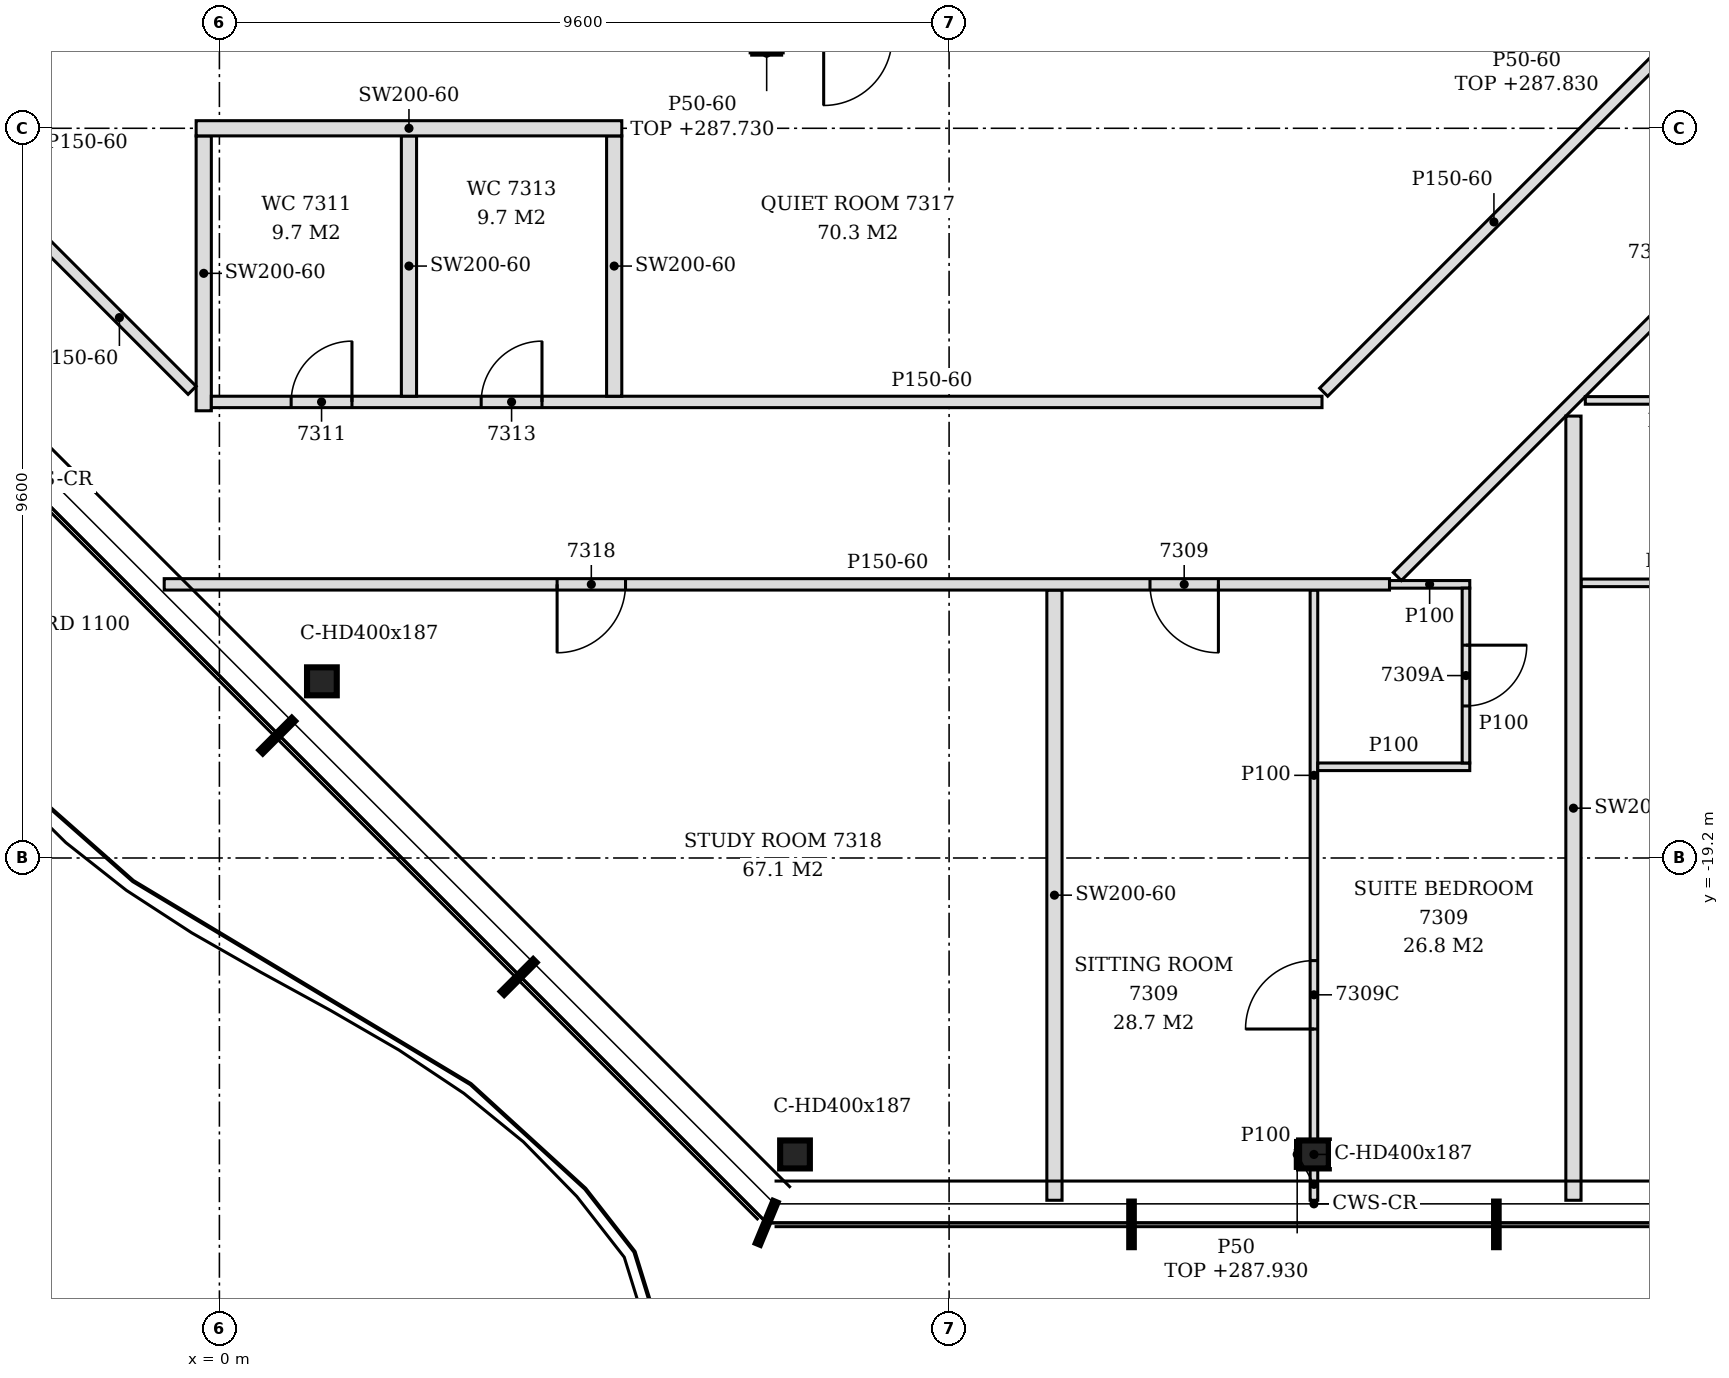
"""IFC4 building model, lengths in metres.
Left out: names, types, materials, properties, quantities, classifications, styles, units other than length and angle.
Written with IfcOpenShell. Run it as: python <this file> out.ifc"""

import sys

from ifc_helpers import new_model, si_unit, direction, frame, frame_2d, origin, origin_2d, place, context, subcontext, project, spatial, polyline, rectangle, i_section, outline, extrude, element, fill, save


model = new_model("IFC4")
c1 = context("Model", 3, precision=1e-05, world=origin(), true_north=direction((0.0, 1.0)))
c2 = subcontext(c1, "Body", "Model", "MODEL_VIEW")
j1 = project(units=[si_unit("LENGTHUNIT", "METRE"), si_unit("PLANEANGLEUNIT", "RADIAN")], contexts=[c1])
p1 = place(None, origin())
s1 = spatial("IfcSite", under=j1, at=p1, CompositionType="ELEMENT")
p2 = place(p1, origin())
s2 = spatial("IfcBuilding", under=s1, at=p2, CompositionType="ELEMENT")
p3 = place(p2, frame((0.0, 0.0, 285.0)))
s3 = spatial("IfcBuildingStorey", under=s2, at=p3, CompositionType="ELEMENT", Elevation=285.0)
for number, where, z_axis, x_axis in (
    (1, (7.573, -23.1, -0.15), (0.0, 0.0, 1.0), (1.0, 0.0, 0.0)),
    (2, (14.4, -23.1, -0.15), (0.0, 0.0, 1.0), (1.0, 0.0, 0.0)),
    (3, (1.348, -16.876, -0.15), (0.0, 0.0, 1.0), (1.0, 0.0, 0.0)),
):
    element("IfcColumn", number, at=place(p3, frame(where, z_axis=z_axis, x_axis=x_axis)), inside=s3, PredefinedType="COLUMN", context=c2, shape_type="SweptSolid", body=[
        extrude(i_section(OverallWidth=0.391, OverallDepth=0.368, WebThickness=0.015, FlangeThickness=0.024, FilletRadius=0.015, at=origin_2d()), origin(), (0.0, 0.0, 1.0), 3.6),
    ])
p4 = place(p3, frame((10.986, -23.703, 0.0), z_axis=(0.0, 0.0, 1.0), x_axis=(0.0, 1.0, 0.0)))
e4 = element("IfcWall", 4, at=p4, inside=s3, PredefinedType="PARTITIONING", context=c2, shape_type="SweptSolid", body=[
    extrude(outline(polyline([(0.0, 0.0), (8.028, 0.0), (8.028, 3.45), (4.608, 3.45), (4.606, 2.88), (4.398, 2.88), (4.396, 3.45), (0.753, 3.45), (0.751, 2.93), (0.453, 2.93), (0.451, 3.45), (0.0, 3.45), (0.0, 0.0)])), frame((0.0, 0.1, 0.0), z_axis=(0.0, -1.0, 0.0), x_axis=(1.0, 0.0, 0.0)), (0.0, 0.0, 1.0), 0.2),
])
p5 = place(p3, frame((14.4, -23.703, 0.0), z_axis=(0.0, 0.0, 1.0), x_axis=(0.0, 1.0, 0.0)))
e5 = element("IfcWall", 5, at=p5, inside=s3, PredefinedType="PARTITIONING", context=c2, shape_type="SweptSolid", body=[
    extrude(rectangle(XDim=0.419, YDim=0.1, at=frame_2d((0.209, 0.0))), origin(), (0.0, 0.0, 1.0), 3.45),
])
p6 = place(p3, frame((17.814, -23.703, 0.0), z_axis=(0.0, 0.0, 1.0), x_axis=(0.0, 1.0, 0.0)))
e6 = element("IfcWall", 6, at=p6, inside=s3, PredefinedType="PARTITIONING", context=c2, shape_type="SweptSolid", body=[
    extrude(outline(polyline([(0.0, 0.0), (10.317, 0.0), (10.317, 3.45), (9.408, 3.45), (9.406, 2.88), (9.198, 2.88), (9.196, 3.45), (4.608, 3.45), (4.606, 2.88), (4.398, 2.88), (4.396, 3.45), (0.753, 3.45), (0.751, 2.93), (0.453, 2.93), (0.451, 3.45), (0.0, 3.45), (0.0, 0.0)])), frame((0.0, 0.1, 0.0), z_axis=(0.0, -1.0, 0.0), x_axis=(1.0, 0.0, 0.0)), (0.0, 0.0, 1.0), 0.2),
])
p7 = place(p3, frame((14.4, -22.916, 0.0), z_axis=(0.0, 0.0, 1.0), x_axis=(0.0, 1.0, 0.0)))
e7 = element("IfcWall", 7, at=p7, inside=s3, PredefinedType="PARTITIONING", context=c2, shape_type="SweptSolid", body=[
    extrude(outline(polyline([(0.0, 0.0), (7.241, 0.0), (7.241, 3.45), (3.821, 3.45), (3.819, 2.88), (3.611, 2.88), (3.609, 3.45), (0.0, 3.45), (0.0, 0.0)])), frame((0.0, 0.05, 0.0), z_axis=(0.0, -1.0, 0.0), x_axis=(1.0, 0.0, 0.0)), (0.0, 0.0, 1.0), 0.1),
])
p8 = place(p7, frame((1.466, 0.0, 0.0)))
e8 = element("IfcOpeningElement", 8, at=p8, cuts=e7, PredefinedType="OPENING", context=c2, shape_type="SweptSolid", body=[
    extrude(rectangle(XDim=0.9, YDim=2.1, at=frame_2d((0.45, 1.05))), frame((0.0, 0.06, 0.0), z_axis=(0.0, -1.0, 0.0), x_axis=(1.0, 0.0, 0.0)), (0.0, 0.0, 1.0), 0.12),
])
p9 = place(p3, frame((14.45, -18.0, 0.0), z_axis=(0.0, 0.0, 1.0), x_axis=(1.0, 0.0, 0.0)))
e9 = element("IfcWall", 9, at=p9, inside=s3, PredefinedType="PARTITIONING", context=c2, shape_type="SweptSolid", body=[
    extrude(rectangle(XDim=2.0, YDim=0.1, at=frame_2d((1.0, 0.0))), origin(), (0.0, 0.0, 1.0), 3.45),
])
p10 = place(p3, frame((16.4, -17.95, 0.0), z_axis=(0.0, 0.0, 1.0), x_axis=(0.0, 1.0, 0.0)))
e10 = element("IfcWall", 10, at=p10, inside=s3, PredefinedType="PARTITIONING", context=c2, shape_type="SweptSolid", body=[
    extrude(rectangle(XDim=2.3, YDim=0.1, at=frame_2d((1.15, 0.0))), origin(), (0.0, 0.0, 1.0), 3.45),
])
p11 = place(p10, frame((0.75, 0.0, 0.0)))
e11 = element("IfcOpeningElement", 11, at=p11, cuts=e10, PredefinedType="OPENING", context=c2, shape_type="SweptSolid", body=[
    extrude(rectangle(XDim=0.8, YDim=2.1, at=frame_2d((0.4, 1.05))), frame((0.0, 0.06, 0.0), z_axis=(0.0, -1.0, 0.0), x_axis=(1.0, 0.0, 0.0)), (0.0, 0.0, 1.0), 0.12),
])
p12 = place(p3, frame((-0.726, -15.6, 0.0), z_axis=(0.0, 0.0, 1.0), x_axis=(1.0, 0.0, 0.0)))
e12 = element("IfcWall", 12, at=p12, inside=s3, PredefinedType="PARTITIONING", context=c2, shape_type="SweptSolid", body=[
    extrude(outline(polyline([(0.0, 0.0), (16.12, 0.0), (16.12, 3.45), (8.076, 3.45), (8.074, 2.73), (7.776, 2.73), (7.774, 3.45), (1.369, 3.45), (1.367, 2.63), (0.229, 2.63), (0.227, 3.45), (0.0, 3.45), (0.0, 0.0)])), frame((0.0, 0.075, 0.0), z_axis=(0.0, -1.0, 0.0), x_axis=(1.0, 0.0, 0.0)), (0.0, 0.0, 1.0), 0.15),
])
p13 = place(p12, frame((12.969, 0.0, 0.0)))
e13 = element("IfcOpeningElement", 13, at=p13, cuts=e12, PredefinedType="OPENING", context=c2, shape_type="SweptSolid", body=[
    extrude(rectangle(XDim=0.9, YDim=2.1, at=frame_2d((0.45, 1.05))), frame((0.0, 0.085, 0.0), z_axis=(0.0, -1.0, 0.0), x_axis=(1.0, 0.0, 0.0)), (0.0, 0.0, 1.0), 0.17),
])
p14 = place(p12, frame((5.169, 0.0, 0.0)))
e14 = element("IfcOpeningElement", 14, at=p14, cuts=e12, PredefinedType="OPENING", context=c2, shape_type="SweptSolid", body=[
    extrude(rectangle(XDim=0.9, YDim=2.1, at=frame_2d((0.45, 1.05))), frame((0.0, 0.085, 0.0), z_axis=(0.0, -1.0, 0.0), x_axis=(1.0, 0.0, 0.0)), (0.0, 0.0, 1.0), 0.17),
])
p15 = place(p3, frame((15.394, -15.6, 0.0), z_axis=(0.0, 0.0, 1.0), x_axis=(1.0, 0.0, 0.0)))
e15 = element("IfcWall", 15, at=p15, inside=s3, PredefinedType="PARTITIONING", context=c2, shape_type="SweptSolid", body=[
    extrude(rectangle(XDim=1.056, YDim=0.1, at=frame_2d((0.528, 0.0))), origin(), (0.0, 0.0, 1.0), 3.45),
])
p16 = place(p3, frame((17.914, -15.58, 0.0), z_axis=(0.0, 0.0, 1.0), x_axis=(1.0, 0.0, 0.0)))
e16 = element("IfcWall", 16, at=p16, inside=s3, PredefinedType="PARTITIONING", context=c2, shape_type="SweptSolid", body=[
    extrude(outline(polyline([(0.0, 0.0), (2.35, 0.0), (2.35, 3.45), (1.436, 3.45), (1.434, 2.73), (1.136, 2.73), (1.134, 3.45), (0.0, 3.45), (0.0, 0.0)])), frame((0.0, 0.05, 0.0), z_axis=(0.0, -1.0, 0.0), x_axis=(1.0, 0.0, 0.0)), (0.0, 0.0, 1.0), 0.1),
])
p17 = place(p3, frame((15.497, -15.497, 0.0), z_axis=(0.0, 0.0, 1.0), x_axis=(0.707106781187, 0.707106781187, 0.0)))
e17 = element("IfcWall", 17, at=p17, inside=s3, PredefinedType="PARTITIONING", context=c2, shape_type="SweptSolid", body=[
    extrude(rectangle(XDim=21.79, YDim=0.15, at=frame_2d((10.895, 0.0))), origin(), (0.0, 0.0, 1.0), 2.73),
])
p18 = place(p17, frame((4.927, 0.0, 0.0)))
e18 = element("IfcOpeningElement", 18, at=p18, cuts=e17, PredefinedType="OPENING", context=c2, shape_type="SweptSolid", body=[
    extrude(rectangle(XDim=0.9, YDim=2.1, at=frame_2d((0.45, 1.05))), frame((0.0, 0.085, 0.0), z_axis=(0.0, -1.0, 0.0), x_axis=(1.0, 0.0, 0.0)), (0.0, 0.0, 1.0), 0.17),
])
p19 = place(p17, frame((10.926, 0.0, 0.0)))
e19 = element("IfcOpeningElement", 19, at=p19, cuts=e17, PredefinedType="OPENING", context=c2, shape_type="SweptSolid", body=[
    extrude(rectangle(XDim=0.9, YDim=2.1, at=frame_2d((0.45, 1.05))), frame((0.0, 0.085, 0.0), z_axis=(0.0, -1.0, 0.0), x_axis=(1.0, 0.0, 0.0)), (0.0, 0.0, 1.0), 0.17),
])
p20 = place(p17, frame((19.345, 0.0, 0.0)))
e20 = element("IfcOpeningElement", 20, at=p20, cuts=e17, PredefinedType="OPENING", context=c2, shape_type="SweptSolid", body=[
    extrude(rectangle(XDim=0.9, YDim=2.1, at=frame_2d((0.45, 1.05))), frame((0.0, 0.085, 0.0), z_axis=(0.0, -1.0, 0.0), x_axis=(1.0, 0.0, 0.0)), (0.0, 0.0, 1.0), 0.17),
])
p21 = place(p3, frame((-0.206, -13.316, 0.0), z_axis=(0.0, 0.0, 1.0), x_axis=(0.0, 1.0, 0.0)))
e21 = element("IfcWall", 21, at=p21, inside=s3, PredefinedType="PARTITIONING", context=c2, shape_type="SweptSolid", body=[
    extrude(rectangle(XDim=3.616, YDim=0.2, at=frame_2d((1.808, 0.0))), origin(), (0.0, 0.0, 1.0), 3.45),
])
p22 = place(p3, frame((-0.106, -13.2, 0.0), z_axis=(0.0, 0.0, 1.0), x_axis=(1.0, 0.0, 0.0)))
e22 = element("IfcWall", 22, at=p22, inside=s3, PredefinedType="PARTITIONING", context=c2, shape_type="SweptSolid", body=[
    extrude(outline(polyline([(0.0, 0.0), (14.612, 0.0), (14.612, 3.45), (7.456, 3.45), (7.454, 2.73), (7.156, 2.73), (7.154, 3.45), (0.0, 3.45), (0.0, 0.0)])), frame((0.0, 0.075, 0.0), z_axis=(0.0, -1.0, 0.0), x_axis=(1.0, 0.0, 0.0)), (0.0, 0.0, 1.0), 0.15),
])
p23 = place(p22, frame((1.05, 0.0, 0.0)))
e23 = element("IfcOpeningElement", 23, at=p23, cuts=e22, PredefinedType="OPENING", context=c2, shape_type="SweptSolid", body=[
    extrude(rectangle(XDim=0.8, YDim=2.1, at=frame_2d((0.4, 1.05))), frame((0.0, 0.085, 0.0), z_axis=(0.0, -1.0, 0.0), x_axis=(1.0, 0.0, 0.0)), (0.0, 0.0, 1.0), 0.17),
])
p24 = place(p22, frame((3.55, 0.0, 0.0)))
e24 = element("IfcOpeningElement", 24, at=p24, cuts=e22, PredefinedType="OPENING", context=c2, shape_type="SweptSolid", body=[
    extrude(rectangle(XDim=0.8, YDim=2.1, at=frame_2d((0.4, 1.05))), frame((0.0, 0.085, 0.0), z_axis=(0.0, -1.0, 0.0), x_axis=(1.0, 0.0, 0.0)), (0.0, 0.0, 1.0), 0.17),
])
p25 = place(p3, frame((17.97, -13.18, 0.0), z_axis=(0.0, 0.0, 1.0), x_axis=(1.0, 0.0, 0.0)))
e25 = element("IfcWall", 25, at=p25, inside=s3, PredefinedType="PARTITIONING", context=c2, shape_type="SweptSolid", body=[
    extrude(outline(polyline([(0.0, 0.0), (2.294, 0.0), (2.294, 3.45), (1.38, 3.45), (1.378, 2.73), (1.08, 2.73), (1.078, 3.45), (0.0, 3.45), (0.0, 0.0)])), frame((0.0, 0.05, 0.0), z_axis=(0.0, -1.0, 0.0), x_axis=(1.0, 0.0, 0.0)), (0.0, 0.0, 1.0), 0.1),
])
for number, where, z_axis, x_axis in (
    (26, (2.494, -13.125, 0.0), (0.0, 0.0, 1.0), (0.0, 1.0, 0.0)),
    (27, (5.194, -13.125, 0.0), (0.0, 0.0, 1.0), (0.0, 1.0, 0.0)),
):
    element("IfcWall", number, at=place(p3, frame(where, z_axis=z_axis, x_axis=x_axis)), inside=s3, PredefinedType="PARTITIONING", context=c2, shape_type="SweptSolid", body=[
        extrude(rectangle(XDim=3.425, YDim=0.2, at=frame_2d((1.712, 0.0))), origin(), (0.0, 0.0, 1.0), 3.45),
    ])
p26 = place(p3, frame((14.528, -13.072, 0.0), z_axis=(0.0, 0.0, 1.0), x_axis=(0.707106781187, 0.707106781187, 0.0)))
e28 = element("IfcWall", 28, at=p26, inside=s3, PredefinedType="PARTITIONING", context=c2, shape_type="SweptSolid", body=[
    extrude(rectangle(XDim=6.335, YDim=0.15, at=frame_2d((3.167, 0.0))), origin(), (0.0, 0.0, 1.0), 3.45),
])
p27 = place(p3, frame((-0.359, -13.047, 0.0), z_axis=(0.0, 0.0, 1.0), x_axis=(-0.707106781187, 0.707106781187, 0.0)))
e29 = element("IfcWall", 29, at=p27, inside=s3, PredefinedType="PARTITIONING", context=c2, shape_type="SweptSolid", body=[
    extrude(rectangle(XDim=2.706, YDim=0.15, at=frame_2d((1.353, 0.0))), origin(), (0.0, 0.0, 1.0), 3.45),
])
p28 = place(p3, frame((-0.306, -9.6, 0.0), z_axis=(0.0, 0.0, 1.0), x_axis=(1.0, 0.0, 0.0)))
e30 = element("IfcWall", 30, at=p28, inside=s3, PredefinedType="PARTITIONING", context=c2, shape_type="SweptSolid", body=[
    extrude(rectangle(XDim=5.6, YDim=0.2, at=frame_2d((2.8, 0.0))), origin(), (0.0, 0.0, 1.0), 3.45),
])
p29 = place(p3, frame((14.179, -23.284, 0.0), z_axis=(0.0, 0.0, 1.0), x_axis=(0.0, 1.0, 0.0)))
e31 = element("IfcWall", 31, at=p29, inside=s3, PredefinedType="PARTITIONING", context=c2, shape_type="SweptSolid", body=[
    extrude(rectangle(XDim=0.368, YDim=0.05, at=frame_2d((0.184, 0.0))), origin(), (0.0, 0.0, 1.0), 2.93),
])
p30 = place(p3, frame((7.003, -8.613, 0.0), z_axis=(0.0, 0.0, 1.0), x_axis=(1.0, 0.0, 0.0)))
e32 = element("IfcWall", 32, at=p30, inside=s3, PredefinedType="PARTITIONING", context=c2, shape_type="SweptSolid", body=[
    extrude(rectangle(XDim=0.394, YDim=0.05, at=frame_2d((0.197, 0.0))), origin(), (0.0, 0.0, 1.0), 2.73),
])
p31 = place(p13, frame((0.9, 0.0, 0.0), z_axis=(0.0, 0.0, 1.0), x_axis=(-1.0, 0.0, 0.0)))
e33 = element("IfcDoor", 33, at=p31, inside=s3, OperationType="SINGLE_SWING_LEFT", PredefinedType="DOOR", context=c2, shape_type="SweptSolid", body=[
    extrude(rectangle(XDim=0.9, YDim=2.1, at=frame_2d((0.45, 1.05))), frame((0.0, 0.025, 0.0), z_axis=(0.0, -1.0, 0.0), x_axis=(1.0, 0.0, 0.0)), (0.0, 0.0, 1.0), 0.05),
])
fill(e13, e33)
p32 = place(p8, origin())
e34 = element("IfcDoor", 34, at=p32, inside=s3, OperationType="SINGLE_SWING_LEFT", PredefinedType="DOOR", context=c2, shape_type="SweptSolid", body=[
    extrude(rectangle(XDim=0.9, YDim=2.1, at=frame_2d((0.45, 1.05))), frame((0.0, 0.025, 0.0), z_axis=(0.0, -1.0, 0.0), x_axis=(1.0, 0.0, 0.0)), (0.0, 0.0, 1.0), 0.05),
])
fill(e8, e34)
p33 = place(p11, frame((0.8, 0.0, 0.0), z_axis=(0.0, 0.0, 1.0), x_axis=(-1.0, 0.0, 0.0)))
e35 = element("IfcDoor", 35, at=p33, inside=s3, OperationType="SINGLE_SWING_LEFT", PredefinedType="DOOR", context=c2, shape_type="SweptSolid", body=[
    extrude(rectangle(XDim=0.8, YDim=2.1, at=frame_2d((0.4, 1.05))), frame((0.0, 0.025, 0.0), z_axis=(0.0, -1.0, 0.0), x_axis=(1.0, 0.0, 0.0)), (0.0, 0.0, 1.0), 0.05),
])
fill(e11, e35)
p34 = place(p23, origin())
e36 = element("IfcDoor", 36, at=p34, inside=s3, OperationType="SINGLE_SWING_RIGHT", PredefinedType="DOOR", context=c2, shape_type="SweptSolid", body=[
    extrude(rectangle(XDim=0.8, YDim=2.1, at=frame_2d((0.4, 1.05))), frame((0.0, 0.025, 0.0), z_axis=(0.0, -1.0, 0.0), x_axis=(1.0, 0.0, 0.0)), (0.0, 0.0, 1.0), 0.05),
])
fill(e23, e36)
p35 = place(p24, origin())
e37 = element("IfcDoor", 37, at=p35, inside=s3, OperationType="SINGLE_SWING_RIGHT", PredefinedType="DOOR", context=c2, shape_type="SweptSolid", body=[
    extrude(rectangle(XDim=0.8, YDim=2.1, at=frame_2d((0.4, 1.05))), frame((0.0, 0.025, 0.0), z_axis=(0.0, -1.0, 0.0), x_axis=(1.0, 0.0, 0.0)), (0.0, 0.0, 1.0), 0.05),
])
fill(e24, e37)
p36 = place(p14, frame((0.9, 0.0, 0.0), z_axis=(0.0, 0.0, 1.0), x_axis=(-1.0, 0.0, 0.0)))
e38 = element("IfcDoor", 38, at=p36, inside=s3, OperationType="SINGLE_SWING_RIGHT", PredefinedType="DOOR", context=c2, shape_type="SweptSolid", body=[
    extrude(rectangle(XDim=0.9, YDim=2.1, at=frame_2d((0.45, 1.05))), frame((0.0, 0.025, 0.0), z_axis=(0.0, -1.0, 0.0), x_axis=(1.0, 0.0, 0.0)), (0.0, 0.0, 1.0), 0.05),
])
fill(e14, e38)
save(model, sys.argv[1])
